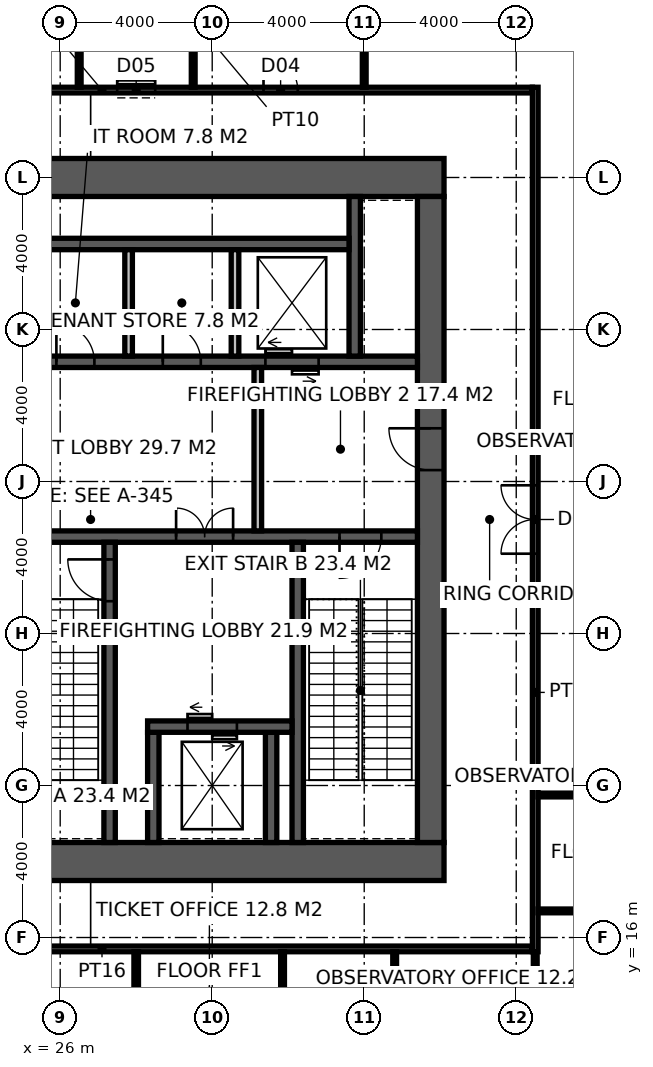
"""IFC4 building model, lengths in metres.
Left out: names, types, materials, properties, quantities, classifications, styles, units other than length and angle.
Written with IfcOpenShell. Run it as: python <this file> out.ifc"""

import sys

from ifc_helpers import new_model, si_unit, direction, frame, frame_2d, origin, place, context, subcontext, project, spatial, rectangle, extrude, element, fill, save


model = new_model("IFC4")
c1 = context("Model", 3, precision=1e-05, world=origin(), true_north=direction((0.0, 1.0)))
c2 = subcontext(c1, "Body", "Model", "MODEL_VIEW")
j1 = project(units=[si_unit("LENGTHUNIT", "METRE"), si_unit("PLANEANGLEUNIT", "RADIAN")], contexts=[c1])
p1 = place(None, origin())
s1 = spatial("IfcSite", under=j1, at=p1, CompositionType="ELEMENT")
p2 = place(p1, origin())
s2 = spatial("IfcBuilding", under=s1, at=p2, CompositionType="ELEMENT")
p3 = place(p2, frame((0.0, 0.0, 298.2)))
s3 = spatial("IfcBuildingStorey", under=s2, at=p3, CompositionType="ELEMENT", Elevation=298.2)
p4 = place(p3, frame((18.5, 18.0, -0.15), z_axis=(0.0, 0.0, 1.0), x_axis=(1.0, 0.0, 0.0)))
e1 = element("IfcWall", 1, at=p4, inside=s3, PredefinedType="SHEAR", context=c2, shape_type="SweptSolid", body=[
    extrude(rectangle(XDim=17.6, YDim=1.0, at=frame_2d((8.8, 0.0))), origin(), (0.0, 0.0, 1.0), 5.85),
])
p5 = place(p4, frame((3.45, 0.0, 0.15)))
e2 = element("IfcOpeningElement", 2, at=p5, cuts=e1, PredefinedType="OPENING", context=c2, shape_type="SweptSolid", body=[
    extrude(rectangle(XDim=1.5, YDim=2.4, at=frame_2d((0.75, 1.2))), frame((0.0, 0.51, 0.0), z_axis=(0.0, -1.0, 0.0), x_axis=(1.0, 0.0, 0.0)), (0.0, 0.0, 1.0), 1.02),
])
p6 = place(p3, frame((18.5, 36.0, -0.15), z_axis=(0.0, 0.0, 1.0), x_axis=(1.0, 0.0, 0.0)))
e3 = element("IfcWall", 3, at=p6, inside=s3, PredefinedType="SHEAR", context=c2, shape_type="SweptSolid", body=[
    extrude(rectangle(XDim=17.6, YDim=1.0, at=frame_2d((8.8, 0.0))), origin(), (0.0, 0.0, 1.0), 5.85),
])
p7 = place(p3, frame((35.75, 18.5, -0.15), z_axis=(0.0, 0.0, 1.0), x_axis=(0.0, 1.0, 0.0)))
e4 = element("IfcWall", 4, at=p7, inside=s3, PredefinedType="SHEAR", context=c2, shape_type="SweptSolid", body=[
    extrude(rectangle(XDim=17.0, YDim=0.7, at=frame_2d((8.5, 0.0))), origin(), (0.0, 0.0, 1.0), 5.85),
])
p8 = place(p7, frame((9.8, 0.0, 0.15)))
e5 = element("IfcOpeningElement", 5, at=p8, cuts=e4, PredefinedType="OPENING", context=c2, shape_type="SweptSolid", body=[
    extrude(rectangle(XDim=1.1, YDim=2.2, at=frame_2d((0.55, 1.1))), frame((0.0, 0.36, 0.0), z_axis=(0.0, -1.0, 0.0), x_axis=(1.0, 0.0, 0.0)), (0.0, 0.0, 1.0), 0.72),
])
p9 = place(p3, frame((24.15, 26.55, -0.15), z_axis=(0.0, 0.0, 1.0), x_axis=(1.0, 0.0, 0.0)))
e6 = element("IfcWall", 6, at=p9, inside=s3, PredefinedType="SHEAR", context=c2, shape_type="SweptSolid", body=[
    extrude(rectangle(XDim=11.25, YDim=0.3, at=frame_2d((5.625, 0.0))), origin(), (0.0, 0.0, 1.0), 5.85),
])
p10 = place(p9, frame((9.2, 0.0, 0.15)))
e7 = element("IfcOpeningElement", 7, at=p10, cuts=e6, PredefinedType="OPENING", context=c2, shape_type="SweptSolid", body=[
    extrude(rectangle(XDim=1.1, YDim=2.2, at=frame_2d((0.55, 1.1))), frame((0.0, 0.16, 0.0), z_axis=(0.0, -1.0, 0.0), x_axis=(1.0, 0.0, 0.0)), (0.0, 0.0, 1.0), 0.32),
])
p11 = place(p9, frame((4.9, 0.0, 0.15)))
e8 = element("IfcOpeningElement", 8, at=p11, cuts=e6, PredefinedType="OPENING", context=c2, shape_type="SweptSolid", body=[
    extrude(rectangle(XDim=1.5, YDim=2.4, at=frame_2d((0.75, 1.2))), frame((0.0, 0.16, 0.0), z_axis=(0.0, -1.0, 0.0), x_axis=(1.0, 0.0, 0.0)), (0.0, 0.0, 1.0), 0.32),
])
p12 = place(p3, frame((27.3, 18.5, -0.15), z_axis=(0.0, 0.0, 1.0), x_axis=(0.0, 1.0, 0.0)))
e9 = element("IfcWall", 9, at=p12, inside=s3, PredefinedType="SHEAR", context=c2, shape_type="SweptSolid", body=[
    extrude(rectangle(XDim=7.9, YDim=0.3, at=frame_2d((3.95, 0.0))), origin(), (0.0, 0.0, 1.0), 5.85),
])
p13 = place(p12, frame((6.35, 0.0, 0.15)))
e10 = element("IfcOpeningElement", 10, at=p13, cuts=e9, PredefinedType="OPENING", context=c2, shape_type="SweptSolid", body=[
    extrude(rectangle(XDim=1.1, YDim=2.2, at=frame_2d((0.55, 1.1))), frame((0.0, 0.16, 0.0), z_axis=(0.0, -1.0, 0.0), x_axis=(1.0, 0.0, 0.0)), (0.0, 0.0, 1.0), 0.32),
])
p14 = place(p3, frame((32.25, 18.5, -0.15), z_axis=(0.0, 0.0, 1.0), x_axis=(0.0, 1.0, 0.0)))
e11 = element("IfcWall", 11, at=p14, inside=s3, PredefinedType="SHEAR", context=c2, shape_type="SweptSolid", body=[
    extrude(rectangle(XDim=7.9, YDim=0.3, at=frame_2d((3.95, 0.0))), origin(), (0.0, 0.0, 1.0), 5.85),
])
for number, where, z_axis, x_axis in (
    (12, (28.45, 18.5, -0.15), (0.0, 0.0, 1.0), (0.0, 1.0, 0.0)),
    (13, (31.55, 18.5, -0.15), (0.0, 0.0, 1.0), (0.0, 1.0, 0.0)),
):
    element("IfcWall", number, at=place(p3, frame(where, z_axis=z_axis, x_axis=x_axis)), inside=s3, PredefinedType="SHEAR", context=c2, shape_type="SweptSolid", body=[
        extrude(rectangle(XDim=2.9, YDim=0.3, at=frame_2d((1.45, 0.0))), origin(), (0.0, 0.0, 1.0), 5.85),
    ])
p15 = place(p3, frame((28.3, 21.55, -0.15), z_axis=(0.0, 0.0, 1.0), x_axis=(1.0, 0.0, 0.0)))
e14 = element("IfcWall", 14, at=p15, inside=s3, PredefinedType="SHEAR", context=c2, shape_type="SweptSolid", body=[
    extrude(rectangle(XDim=3.8, YDim=0.3, at=frame_2d((1.9, 0.0))), origin(), (0.0, 0.0, 1.0), 5.85),
])
p16 = place(p15, frame((1.05, 0.0, 0.15)))
e15 = element("IfcOpeningElement", 15, at=p16, cuts=e14, PredefinedType="OPENING", context=c2, shape_type="SweptSolid", body=[
    extrude(rectangle(XDim=1.3, YDim=2.4, at=frame_2d((0.65, 1.2))), frame((0.0, 0.16, 0.0), z_axis=(0.0, -1.0, 0.0), x_axis=(1.0, 0.0, 0.0)), (0.0, 0.0, 1.0), 0.32),
])
p17 = place(p3, frame((24.15, 31.15, -0.15), z_axis=(0.0, 0.0, 1.0), x_axis=(1.0, 0.0, 0.0)))
e16 = element("IfcWall", 16, at=p17, inside=s3, PredefinedType="SHEAR", context=c2, shape_type="SweptSolid", body=[
    extrude(rectangle(XDim=11.25, YDim=0.3, at=frame_2d((5.625, 0.0))), origin(), (0.0, 0.0, 1.0), 5.85),
])
p18 = place(p17, frame((1.75, 0.0, 0.15)))
e17 = element("IfcOpeningElement", 17, at=p18, cuts=e16, PredefinedType="OPENING", context=c2, shape_type="SweptSolid", body=[
    extrude(rectangle(XDim=1.0, YDim=2.2, at=frame_2d((0.5, 1.1))), frame((0.0, 0.16, 0.0), z_axis=(0.0, -1.0, 0.0), x_axis=(1.0, 0.0, 0.0)), (0.0, 0.0, 1.0), 0.32),
])
p19 = place(p17, frame((4.55, 0.0, 0.15)))
e18 = element("IfcOpeningElement", 18, at=p19, cuts=e16, PredefinedType="OPENING", context=c2, shape_type="SweptSolid", body=[
    extrude(rectangle(XDim=1.0, YDim=2.2, at=frame_2d((0.5, 1.1))), frame((0.0, 0.16, 0.0), z_axis=(0.0, -1.0, 0.0), x_axis=(1.0, 0.0, 0.0)), (0.0, 0.0, 1.0), 0.32),
])
p20 = place(p17, frame((7.25, 0.0, 0.15)))
e19 = element("IfcOpeningElement", 19, at=p20, cuts=e16, PredefinedType="OPENING", context=c2, shape_type="SweptSolid", body=[
    extrude(rectangle(XDim=1.4, YDim=2.4, at=frame_2d((0.7, 1.2))), frame((0.0, 0.16, 0.0), z_axis=(0.0, -1.0, 0.0), x_axis=(1.0, 0.0, 0.0)), (0.0, 0.0, 1.0), 0.32),
])
p21 = place(p3, frame((33.75, 31.3, -0.15), z_axis=(0.0, 0.0, 1.0), x_axis=(0.0, 1.0, 0.0)))
e20 = element("IfcWall", 20, at=p21, inside=s3, PredefinedType="SHEAR", context=c2, shape_type="SweptSolid", body=[
    extrude(rectangle(XDim=4.2, YDim=0.3, at=frame_2d((2.1, 0.0))), origin(), (0.0, 0.0, 1.0), 5.85),
])
p22 = place(p3, frame((25.0, 34.25, -0.15), z_axis=(0.0, 0.0, 1.0), x_axis=(1.0, 0.0, 0.0)))
e21 = element("IfcWall", 21, at=p22, inside=s3, PredefinedType="SHEAR", context=c2, shape_type="SweptSolid", body=[
    extrude(rectangle(XDim=8.6, YDim=0.3, at=frame_2d((4.3, 0.0))), origin(), (0.0, 0.0, 1.0), 5.85),
])
p23 = place(p3, frame((27.8, 31.3, 0.0), z_axis=(0.0, 0.0, 1.0), x_axis=(0.0, 1.0, 0.0)))
e22 = element("IfcWall", 22, at=p23, inside=s3, PredefinedType="SOLIDWALL", context=c2, shape_type="SweptSolid", body=[
    extrude(rectangle(XDim=2.8, YDim=0.2, at=frame_2d((1.4, 0.0))), origin(), (0.0, 0.0, 1.0), 5.7),
])
p24 = place(p3, frame((30.6, 31.3, -0.15), z_axis=(0.0, 0.0, 1.0), x_axis=(0.0, 1.0, 0.0)))
e23 = element("IfcWall", 23, at=p24, inside=s3, PredefinedType="SOLIDWALL", context=c2, shape_type="SweptSolid", body=[
    extrude(rectangle(XDim=2.8, YDim=0.2, at=frame_2d((1.4, 0.0))), origin(), (0.0, 0.0, 1.0), 5.85),
])
p25 = place(p3, frame((31.2, 26.7, 0.0), z_axis=(0.0, 0.0, 1.0), x_axis=(0.0, 1.0, 0.0)))
e24 = element("IfcWall", 24, at=p25, inside=s3, PredefinedType="SOLIDWALL", context=c2, shape_type="SweptSolid", body=[
    extrude(rectangle(XDim=4.3, YDim=0.2, at=frame_2d((2.15, 0.0))), origin(), (0.0, 0.0, 1.0), 5.7),
])
p26 = place(p3, frame((38.5, 15.625, 0.0), z_axis=(0.0, 0.0, 1.0), x_axis=(0.0, 1.0, 0.0)))
e25 = element("IfcWall", 25, at=p26, inside=s3, PredefinedType="PARTITIONING", context=c2, shape_type="SweptSolid", body=[
    extrude(rectangle(XDim=22.75, YDim=0.15, at=frame_2d((11.375, 0.0))), origin(), (0.0, 0.0, 1.0), 5.7),
])
p27 = place(p26, frame((10.475, 0.0, 0.0)))
e26 = element("IfcOpeningElement", 26, at=p27, cuts=e25, PredefinedType="OPENING", context=c2, shape_type="SweptSolid", body=[
    extrude(rectangle(XDim=1.8, YDim=2.4, at=frame_2d((0.9, 1.2))), frame((0.0, 0.085, 0.0), z_axis=(0.0, -1.0, 0.0), x_axis=(1.0, 0.0, 0.0)), (0.0, 0.0, 1.0), 0.17),
])
p28 = place(p3, frame((15.775, 15.7, 0.0), z_axis=(0.0, 0.0, 1.0), x_axis=(1.0, 0.0, 0.0)))
e27 = element("IfcWall", 27, at=p28, inside=s3, PredefinedType="PARTITIONING", context=c2, shape_type="SweptSolid", body=[
    extrude(rectangle(XDim=22.65, YDim=0.15, at=frame_2d((11.325, 0.0))), origin(), (0.0, 0.0, 1.0), 5.7),
])
p29 = place(p28, frame((5.225, 0.0, 0.0)))
e28 = element("IfcOpeningElement", 28, at=p29, cuts=e27, PredefinedType="OPENING", context=c2, shape_type="SweptSolid", body=[
    extrude(rectangle(XDim=2.0, YDim=2.7, at=frame_2d((1.0, 1.35))), frame((0.0, 0.085, 0.0), z_axis=(0.0, -1.0, 0.0), x_axis=(1.0, 0.0, 0.0)), (0.0, 0.0, 1.0), 0.17),
])
p30 = place(p3, frame((15.775, 38.3, 0.0), z_axis=(0.0, 0.0, 1.0), x_axis=(1.0, 0.0, 0.0)))
e29 = element("IfcWall", 29, at=p30, inside=s3, PredefinedType="PARTITIONING", context=c2, shape_type="SweptSolid", body=[
    extrude(rectangle(XDim=22.65, YDim=0.15, at=frame_2d((11.325, 0.0))), origin(), (0.0, 0.0, 1.0), 5.7),
])
p31 = place(p30, frame((7.975, 0.0, 0.0)))
e30 = element("IfcOpeningElement", 30, at=p31, cuts=e29, PredefinedType="OPENING", context=c2, shape_type="SweptSolid", body=[
    extrude(rectangle(XDim=0.9, YDim=2.1, at=frame_2d((0.45, 1.05))), frame((0.0, 0.085, 0.0), z_axis=(0.0, -1.0, 0.0), x_axis=(1.0, 0.0, 0.0)), (0.0, 0.0, 1.0), 0.17),
])
p32 = place(p30, frame((11.725, 0.0, 0.0)))
e31 = element("IfcOpeningElement", 31, at=p32, cuts=e29, PredefinedType="OPENING", context=c2, shape_type="SweptSolid", body=[
    extrude(rectangle(XDim=1.0, YDim=2.1, at=frame_2d((0.5, 1.05))), frame((0.0, 0.085, 0.0), z_axis=(0.0, -1.0, 0.0), x_axis=(1.0, 0.0, 0.0)), (0.0, 0.0, 1.0), 0.17),
])
p33 = place(p30, frame((15.575, 0.0, 0.0)))
e32 = element("IfcOpeningElement", 32, at=p33, cuts=e29, PredefinedType="OPENING", context=c2, shape_type="SweptSolid", body=[
    extrude(rectangle(XDim=0.9, YDim=2.1, at=frame_2d((0.45, 1.05))), frame((0.0, 0.085, 0.0), z_axis=(0.0, -1.0, 0.0), x_axis=(1.0, 0.0, 0.0)), (0.0, 0.0, 1.0), 0.17),
])
p34 = place(p3, frame((34.0, 38.375, 0.0), z_axis=(0.0, 0.0, 1.0), x_axis=(0.0, 1.0, 0.0)))
e33 = element("IfcWall", 33, at=p34, inside=s3, PredefinedType="PARTITIONING", context=c2, shape_type="SweptSolid", body=[
    extrude(rectangle(XDim=3.675, YDim=0.1, at=frame_2d((1.837, 0.0))), origin(), (0.0, 0.0, 1.0), 4.8),
])
for number, where, z_axis, x_axis in (
    (34, (26.5, 38.375, 0.0), (0.0, 0.0, 1.0), (0.0, 1.0, 0.0)),
    (35, (29.5, 38.375, 0.0), (0.0, 0.0, 1.0), (0.0, 1.0, 0.0)),
):
    element("IfcWall", number, at=place(p3, frame(where, z_axis=z_axis, x_axis=x_axis)), inside=s3, PredefinedType="PARTITIONING", context=c2, shape_type="SweptSolid", body=[
        extrude(rectangle(XDim=3.575, YDim=0.1, at=frame_2d((1.788, 0.0))), origin(), (0.0, 0.0, 1.0), 5.7),
    ])
p35 = place(p3, frame((28.0, 4.3, 0.0), z_axis=(0.0, 0.0, 1.0), x_axis=(0.0, 1.0, 0.0)))
e36 = element("IfcWall", 36, at=p35, inside=s3, PredefinedType="PARTITIONING", context=c2, shape_type="SweptSolid", body=[
    extrude(rectangle(XDim=11.325, YDim=0.12, at=frame_2d((5.663, 0.0))), origin(), (0.0, 0.0, 1.0), 5.7),
])
p36 = place(p3, frame((38.575, 16.7, 0.0), z_axis=(0.0, 0.0, 1.0), x_axis=(1.0, 0.0, 0.0)))
e37 = element("IfcWall", 37, at=p36, inside=s3, PredefinedType="PARTITIONING", context=c2, shape_type="SweptSolid", body=[
    extrude(rectangle(XDim=3.575, YDim=0.1, at=frame_2d((1.788, 0.0))), origin(), (0.0, 0.0, 1.0), 5.7),
])
p37 = place(p3, frame((38.575, 19.75, 0.0), z_axis=(0.0, 0.0, 1.0), x_axis=(1.0, 0.0, 0.0)))
e38 = element("IfcWall", 38, at=p37, inside=s3, PredefinedType="PARTITIONING", context=c2, shape_type="SweptSolid", body=[
    extrude(rectangle(XDim=3.575, YDim=0.1, at=frame_2d((1.788, 0.0))), origin(), (0.0, 0.0, 1.0), 4.8),
])
for number, where, z_axis, x_axis in (
    (39, (31.851, 12.15, 0.0), (0.0, 0.0, 1.0), (0.0, 1.0, 0.0)),
    (40, (34.801, 12.15, 0.0), (0.0, 0.0, 1.0), (0.0, 1.0, 0.0)),
    (41, (38.5, 12.15, 0.0), (0.0, 0.0, 1.0), (0.0, 1.0, 0.0)),
):
    element("IfcWall", number, at=place(p3, frame(where, z_axis=z_axis, x_axis=x_axis)), inside=s3, PredefinedType="PARTITIONING", context=c2, shape_type="SweptSolid", body=[
        extrude(rectangle(XDim=3.475, YDim=0.1, at=frame_2d((1.738, 0.0))), origin(), (0.0, 0.0, 1.0), 5.7),
    ])
p38 = place(p13, origin())
e42 = element("IfcDoor", 42, at=p38, inside=s3, OperationType="SINGLE_SWING_RIGHT", PredefinedType="DOOR", context=c2, shape_type="SweptSolid", body=[
    extrude(rectangle(XDim=1.1, YDim=2.2, at=frame_2d((0.55, 1.1))), frame((0.0, 0.025, 0.0), z_axis=(0.0, -1.0, 0.0), x_axis=(1.0, 0.0, 0.0)), (0.0, 0.0, 1.0), 0.05),
])
fill(e10, e42)
p39 = place(p10, frame((1.1, 0.0, 0.0), z_axis=(0.0, 0.0, 1.0), x_axis=(-1.0, 0.0, 0.0)))
e43 = element("IfcDoor", 43, at=p39, inside=s3, OperationType="SINGLE_SWING_RIGHT", PredefinedType="DOOR", context=c2, shape_type="SweptSolid", body=[
    extrude(rectangle(XDim=1.1, YDim=2.2, at=frame_2d((0.55, 1.1))), frame((0.0, 0.025, 0.0), z_axis=(0.0, -1.0, 0.0), x_axis=(1.0, 0.0, 0.0)), (0.0, 0.0, 1.0), 0.05),
])
fill(e7, e43)
p40 = place(p8, origin())
e44 = element("IfcDoor", 44, at=p40, inside=s3, OperationType="SINGLE_SWING_RIGHT", PredefinedType="DOOR", context=c2, shape_type="SweptSolid", body=[
    extrude(rectangle(XDim=1.1, YDim=2.2, at=frame_2d((0.55, 1.1))), frame((0.0, 0.025, 0.0), z_axis=(0.0, -1.0, 0.0), x_axis=(1.0, 0.0, 0.0)), (0.0, 0.0, 1.0), 0.05),
])
fill(e5, e44)
p41 = place(p11, origin())
e45 = element("IfcDoor", 45, at=p41, inside=s3, OperationType="DOUBLE_DOOR_DOUBLE_SWING", PredefinedType="DOOR", context=c2, shape_type="SweptSolid", body=[
    extrude(rectangle(XDim=1.5, YDim=2.4, at=frame_2d((0.75, 1.2))), frame((0.0, 0.025, 0.0), z_axis=(0.0, -1.0, 0.0), x_axis=(1.0, 0.0, 0.0)), (0.0, 0.0, 1.0), 0.05),
])
fill(e8, e45)
p42 = place(p18, origin())
e46 = element("IfcDoor", 46, at=p42, inside=s3, OperationType="SINGLE_SWING_LEFT", PredefinedType="DOOR", context=c2, shape_type="SweptSolid", body=[
    extrude(rectangle(XDim=1.0, YDim=2.2, at=frame_2d((0.5, 1.1))), frame((0.0, 0.025, 0.0), z_axis=(0.0, -1.0, 0.0), x_axis=(1.0, 0.0, 0.0)), (0.0, 0.0, 1.0), 0.05),
])
fill(e17, e46)
p43 = place(p19, origin())
e47 = element("IfcDoor", 47, at=p43, inside=s3, OperationType="SINGLE_SWING_LEFT", PredefinedType="DOOR", context=c2, shape_type="SweptSolid", body=[
    extrude(rectangle(XDim=1.0, YDim=2.2, at=frame_2d((0.5, 1.1))), frame((0.0, 0.025, 0.0), z_axis=(0.0, -1.0, 0.0), x_axis=(1.0, 0.0, 0.0)), (0.0, 0.0, 1.0), 0.05),
])
fill(e18, e47)
p44 = place(p32, origin())
e48 = element("IfcDoor", 48, at=p44, inside=s3, OperationType="SLIDING_TO_LEFT", PredefinedType="DOOR", context=c2, shape_type="SweptSolid", body=[
    extrude(rectangle(XDim=1.0, YDim=2.1, at=frame_2d((0.5, 1.05))), frame((0.0, 0.025, 0.0), z_axis=(0.0, -1.0, 0.0), x_axis=(1.0, 0.0, 0.0)), (0.0, 0.0, 1.0), 0.05),
])
fill(e31, e48)
p45 = place(p33, origin())
e49 = element("IfcDoor", 49, at=p45, inside=s3, OperationType="SINGLE_SWING_LEFT", PredefinedType="DOOR", context=c2, shape_type="SweptSolid", body=[
    extrude(rectangle(XDim=0.9, YDim=2.1, at=frame_2d((0.45, 1.05))), frame((0.0, 0.025, 0.0), z_axis=(0.0, -1.0, 0.0), x_axis=(1.0, 0.0, 0.0)), (0.0, 0.0, 1.0), 0.05),
])
fill(e32, e49)
p46 = place(p27, origin())
e50 = element("IfcDoor", 50, at=p46, inside=s3, OperationType="DOUBLE_DOOR_DOUBLE_SWING", PredefinedType="DOOR", context=c2, shape_type="SweptSolid", body=[
    extrude(rectangle(XDim=1.8, YDim=2.4, at=frame_2d((0.9, 1.2))), frame((0.0, 0.025, 0.0), z_axis=(0.0, -1.0, 0.0), x_axis=(1.0, 0.0, 0.0)), (0.0, 0.0, 1.0), 0.05),
])
fill(e26, e50)
p47 = place(p16, origin())
e51 = element("IfcDoor", 51, at=p47, inside=s3, OperationType="DOUBLE_DOOR_SLIDING", PredefinedType="DOOR", context=c2, shape_type="SweptSolid", body=[
    extrude(rectangle(XDim=1.3, YDim=2.4, at=frame_2d((0.65, 1.2))), frame((0.0, 0.025, 0.0), z_axis=(0.0, -1.0, 0.0), x_axis=(1.0, 0.0, 0.0)), (0.0, 0.0, 1.0), 0.05),
])
fill(e15, e51)
p48 = place(p20, origin())
e52 = element("IfcDoor", 52, at=p48, inside=s3, OperationType="DOUBLE_DOOR_SLIDING", PredefinedType="DOOR", context=c2, shape_type="SweptSolid", body=[
    extrude(rectangle(XDim=1.4, YDim=2.4, at=frame_2d((0.7, 1.2))), frame((0.0, 0.025, 0.0), z_axis=(0.0, -1.0, 0.0), x_axis=(1.0, 0.0, 0.0)), (0.0, 0.0, 1.0), 0.05),
])
fill(e19, e52)
save(model, sys.argv[1])
